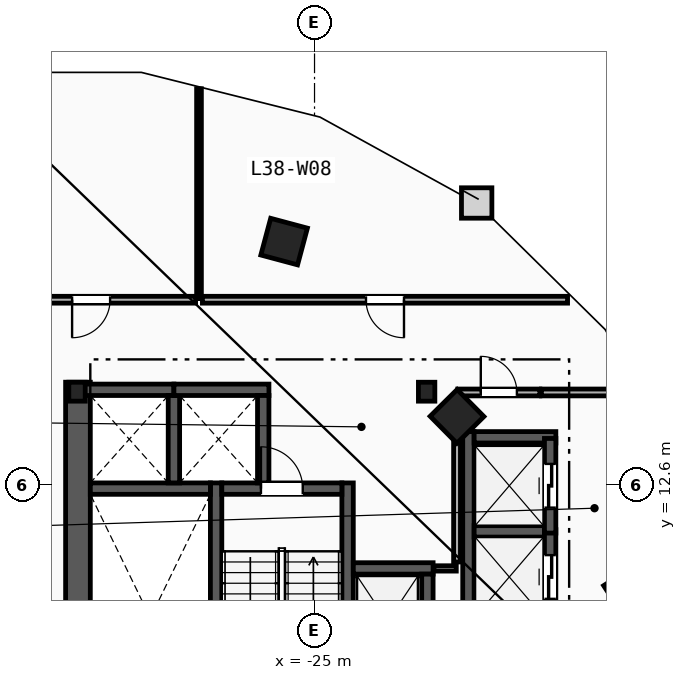
"""IFC4 building model, lengths in metres.
Left out: names, types, materials, properties, quantities, classifications, styles, units other than length and angle.
Written with IfcOpenShell. Run it as: python <this file> out.ifc"""

import sys

from ifc_helpers import new_model, si_unit, direction, frame, frame_2d, origin, origin_2d, place, context, subcontext, project, spatial, rectangle, i_section, extrude, element, fill, save


model = new_model("IFC4")
c1 = context("Model", 3, precision=1e-05, world=origin(), true_north=direction((0.0, 1.0)))
c2 = subcontext(c1, "Body", "Model", "MODEL_VIEW")
j1 = project(units=[si_unit("LENGTHUNIT", "METRE"), si_unit("PLANEANGLEUNIT", "RADIAN")], contexts=[c1])
p1 = place(None, origin())
s1 = spatial("IfcSite", under=j1, at=p1, CompositionType="ELEMENT")
p2 = place(p1, origin())
s2 = spatial("IfcBuilding", under=s1, at=p2, CompositionType="ELEMENT")
p3 = place(p2, frame((0.0, 0.0, 147.6)))
s3 = spatial("IfcBuildingStorey", under=s2, at=p3, CompositionType="ELEMENT", Elevation=147.6)
for number, where, z_axis, x_axis in (
    (1, (-22.05, 15.05, 0.0), (0.0, 0.0, 1.0), (1.0, 0.0, 0.0)),
    (2, (-31.25, 15.05, 0.0), (0.0, 0.0, 1.0), (1.0, 0.0, 0.0)),
):
    element("IfcColumn", number, at=place(p3, frame(where, z_axis=z_axis, x_axis=x_axis)), inside=s3, PredefinedType="COLUMN", context=c2, shape_type="SweptSolid", body=[
        extrude(i_section(OverallWidth=0.432, OverallDepth=0.498, WebThickness=0.056, FlangeThickness=0.089, FilletRadius=0.018, at=origin_2d()), origin(), (0.0, 0.0, 1.0), 3.6),
    ])
for number, where, z_axis, x_axis in (
    (3, (-16.7, 9.8, 0.0), (0.0, 0.0, 1.0), (-0.544, 0.839, 0.0)),
    (4, (-21.25, 14.4, 0.0), (0.0, 0.0, 1.0), (-0.703, 0.711, 0.0)),
    (5, (-25.8, 19.0, 0.0), (0.0, 0.0, 1.0), (-0.966, 0.259, 0.0)),
):
    element("IfcColumn", number, at=place(p3, frame(where, z_axis=z_axis, x_axis=x_axis)), inside=s3, PredefinedType="COLUMN", context=c2, shape_type="SweptSolid", body=[
        extrude(rectangle(XDim=1.0, YDim=1.0, at=origin_2d()), origin(), (0.0, 0.0, 1.0), 3.6),
    ])
p4 = place(p3, frame((-31.225, 1.97, 0.0), z_axis=(0.0, 0.0, 1.0), x_axis=(0.0, 1.0, 0.0)))
e6 = element("IfcWall", 6, at=p4, inside=s3, PredefinedType="SHEAR", context=c2, shape_type="SweptSolid", body=[
    extrude(rectangle(XDim=13.33, YDim=0.65, at=frame_2d((6.665, 0.0))), origin(), (0.0, 0.0, 1.0), 3.36),
])
for number, where, z_axis, x_axis in (
    (7, (-27.59, 1.97, 0.0), (0.0, 0.0, 1.0), (0.0, 1.0, 0.0)),
    (8, (-24.13, 1.97, 0.0), (0.0, 0.0, 1.0), (0.0, 1.0, 0.0)),
):
    element("IfcWall", number, at=place(p3, frame(where, z_axis=z_axis, x_axis=x_axis)), inside=s3, PredefinedType="SHEAR", context=c2, shape_type="SweptSolid", body=[
        extrude(rectangle(XDim=10.68, YDim=0.3, at=frame_2d((5.34, 0.0))), origin(), (0.0, 0.0, 1.0), 3.36),
    ])
p5 = place(p3, frame((-30.9, 12.5, 0.0), z_axis=(0.0, 0.0, 1.0), x_axis=(1.0, 0.0, 0.0)))
e9 = element("IfcWall", 9, at=p5, inside=s3, PredefinedType="SHEAR", context=c2, shape_type="SweptSolid", body=[
    extrude(rectangle(XDim=3.16, YDim=0.3, at=frame_2d((1.58, 0.0))), origin(), (0.0, 0.0, 1.0), 3.36),
])
p6 = place(p3, frame((-27.44, 12.5, 0.0), z_axis=(0.0, 0.0, 1.0), x_axis=(1.0, 0.0, 0.0)))
e10 = element("IfcWall", 10, at=p6, inside=s3, PredefinedType="SHEAR", context=c2, shape_type="SweptSolid", body=[
    extrude(rectangle(XDim=3.16, YDim=0.3, at=frame_2d((1.58, 0.0))), origin(), (0.0, 0.0, 1.0), 3.36),
])
p7 = place(p6, frame((1.03, 0.0, 0.0)))
e11 = element("IfcOpeningElement", 11, at=p7, cuts=e10, PredefinedType="OPENING", context=c2, shape_type="SweptSolid", body=[
    extrude(rectangle(XDim=1.1, YDim=2.15, at=frame_2d((0.55, 1.075))), frame((0.0, 0.16, 0.0), z_axis=(0.0, -1.0, 0.0), x_axis=(1.0, 0.0, 0.0)), (0.0, 0.0, 1.0), 0.32),
])
p8 = place(p3, frame((-23.98, 10.4, 0.0), z_axis=(0.0, 0.0, 1.0), x_axis=(1.0, 0.0, 0.0)))
e12 = element("IfcWall", 12, at=p8, inside=s3, PredefinedType="SHEAR", context=c2, shape_type="SweptSolid", body=[
    extrude(rectangle(XDim=2.1, YDim=0.3, at=frame_2d((1.05, 0.0))), origin(), (0.0, 0.0, 1.0), 3.36),
])
for number, where, z_axis, x_axis in (
    (13, (-22.03, 7.75, 0.0), (0.0, 0.0, 1.0), (0.0, 1.0, 0.0)),
    (14, (-31.2, 15.1, 0.0), (0.0, 0.0, 1.0), (1.0, 0.0, 0.0)),
):
    element("IfcWall", number, at=place(p3, frame(where, z_axis=z_axis, x_axis=x_axis)), inside=s3, PredefinedType="SHEAR", context=c2, shape_type="SweptSolid", body=[
        extrude(rectangle(XDim=2.5, YDim=0.3, at=frame_2d((1.25, 0.0))), origin(), (0.0, 0.0, 1.0), 3.36),
    ])
p9 = place(p3, frame((-28.7, 12.65, 0.0), z_axis=(0.0, 0.0, 1.0), x_axis=(0.0, 1.0, 0.0)))
e15 = element("IfcWall", 15, at=p9, inside=s3, PredefinedType="SHEAR", context=c2, shape_type="SweptSolid", body=[
    extrude(rectangle(XDim=2.3, YDim=0.3, at=frame_2d((1.15, 0.0))), origin(), (0.0, 0.0, 1.0), 3.36),
])
p10 = place(p3, frame((-28.7, 15.1, 0.0), z_axis=(0.0, 0.0, 1.0), x_axis=(1.0, 0.0, 0.0)))
e16 = element("IfcWall", 16, at=p10, inside=s3, PredefinedType="SHEAR", context=c2, shape_type="SweptSolid", body=[
    extrude(rectangle(XDim=2.5, YDim=0.3, at=frame_2d((1.25, 0.0))), origin(), (0.0, 0.0, 1.0), 3.36),
])
p11 = place(p3, frame((-26.35, 12.65, 0.0), z_axis=(0.0, 0.0, 1.0), x_axis=(0.0, 1.0, 0.0)))
e17 = element("IfcWall", 17, at=p11, inside=s3, PredefinedType="SHEAR", context=c2, shape_type="SweptSolid", body=[
    extrude(rectangle(XDim=2.3, YDim=0.3, at=frame_2d((1.15, 0.0))), origin(), (0.0, 0.0, 1.0), 3.36),
])
p12 = place(p3, frame((-20.95, 8.75, 0.0), z_axis=(0.0, 0.0, 1.0), x_axis=(0.0, 1.0, 0.0)))
e18 = element("IfcWall", 18, at=p12, inside=s3, PredefinedType="SHEAR", context=c2, shape_type="SweptSolid", body=[
    extrude(rectangle(XDim=5.25, YDim=0.3, at=frame_2d((2.625, 0.0))), origin(), (0.0, 0.0, 1.0), 3.36),
])
p13 = place(p3, frame((-20.8, 13.85, 0.0), z_axis=(0.0, 0.0, 1.0), x_axis=(1.0, 0.0, 0.0)))
e19 = element("IfcWall", 19, at=p13, inside=s3, PredefinedType="SHEAR", context=c2, shape_type="SweptSolid", body=[
    extrude(rectangle(XDim=2.15, YDim=0.3, at=frame_2d((1.075, 0.0))), origin(), (0.0, 0.0, 1.0), 3.36),
])
p14 = place(p3, frame((-20.8, 11.375, 0.0), z_axis=(0.0, 0.0, 1.0), x_axis=(1.0, 0.0, 0.0)))
e20 = element("IfcWall", 20, at=p14, inside=s3, PredefinedType="SHEAR", context=c2, shape_type="SweptSolid", body=[
    extrude(rectangle(XDim=1.85, YDim=0.3, at=frame_2d((0.925, 0.0))), origin(), (0.0, 0.0, 1.0), 3.36),
])
p15 = place(p3, frame((-18.8, 8.93, 0.0), z_axis=(0.0, 0.0, 1.0), x_axis=(0.0, 1.0, 0.0)))
e21 = element("IfcWall", 21, at=p15, inside=s3, PredefinedType="SHEAR", context=c2, shape_type="SweptSolid", body=[
    extrude(rectangle(XDim=2.49, YDim=0.3, at=frame_2d((1.245, 0.0))), origin(), (0.0, 0.0, 1.0), 3.36),
])
p16 = place(p15, frame((0.67, 0.0, 0.0)))
e22 = element("IfcOpeningElement", 22, at=p16, cuts=e21, PredefinedType="OPENING", context=c2, shape_type="SweptSolid", body=[
    extrude(rectangle(XDim=1.15, YDim=2.2, at=frame_2d((0.575, 1.1))), frame((0.0, 0.16, 0.0), z_axis=(0.0, -1.0, 0.0), x_axis=(1.0, 0.0, 0.0)), (0.0, 0.0, 1.0), 0.32),
])
p17 = place(p3, frame((-18.8, 11.33, 0.0), z_axis=(0.0, 0.0, 1.0), x_axis=(0.0, 1.0, 0.0)))
e23 = element("IfcWall", 23, at=p17, inside=s3, PredefinedType="SHEAR", context=c2, shape_type="SweptSolid", body=[
    extrude(rectangle(XDim=2.49, YDim=0.3, at=frame_2d((1.245, 0.0))), origin(), (0.0, 0.0, 1.0), 3.36),
])
p18 = place(p17, frame((0.67, 0.0, 0.0)))
e24 = element("IfcOpeningElement", 24, at=p18, cuts=e23, PredefinedType="OPENING", context=c2, shape_type="SweptSolid", body=[
    extrude(rectangle(XDim=1.15, YDim=2.2, at=frame_2d((0.575, 1.1))), frame((0.0, 0.16, 0.0), z_axis=(0.0, -1.0, 0.0), x_axis=(1.0, 0.0, 0.0)), (0.0, 0.0, 1.0), 0.32),
])
p19 = place(p3, frame((-21.23, 15.03, 0.0), z_axis=(0.0, 0.0, 1.0), x_axis=(1.0, 0.0, 0.0)))
e25 = element("IfcWall", 25, at=p19, inside=s3, PredefinedType="PARTITIONING", context=c2, shape_type="SweptSolid", body=[
    extrude(rectangle(XDim=2.16, YDim=0.18, at=frame_2d((1.08, 0.0))), origin(), (0.0, 0.0, 1.0), 3.36),
])
p20 = place(p19, frame((0.605, 0.0, 0.0)))
e26 = element("IfcOpeningElement", 26, at=p20, cuts=e25, PredefinedType="OPENING", context=c2, shape_type="SweptSolid", body=[
    extrude(rectangle(XDim=0.95, YDim=2.1, at=frame_2d((0.475, 1.05))), frame((0.0, 0.1, 0.0), z_axis=(0.0, -1.0, 0.0), x_axis=(1.0, 0.0, 0.0)), (0.0, 0.0, 1.0), 0.2),
])
p21 = place(p3, frame((-19.03, 15.03, 0.0), z_axis=(0.0, 0.0, 1.0), x_axis=(1.0, 0.0, 0.0)))
e27 = element("IfcWall", 27, at=p21, inside=s3, PredefinedType="PARTITIONING", context=c2, shape_type="SweptSolid", body=[
    extrude(rectangle(XDim=1.99, YDim=0.18, at=frame_2d((0.995, 0.0))), origin(), (0.0, 0.0, 1.0), 3.36),
])
p22 = place(p3, frame((-21.86, 10.4, 0.0), z_axis=(0.0, 0.0, 1.0), x_axis=(1.0, 0.0, 0.0)))
e28 = element("IfcWall", 28, at=p22, inside=s3, PredefinedType="PARTITIONING", context=c2, shape_type="SweptSolid", body=[
    extrude(rectangle(XDim=0.59, YDim=0.14, at=frame_2d((0.295, 0.0))), origin(), (0.0, 0.0, 1.0), 3.36),
])
p23 = place(p3, frame((-21.25, 10.57, 0.0), z_axis=(0.0, 0.0, 1.0), x_axis=(0.0, 1.0, 0.0)))
e29 = element("IfcWall", 29, at=p23, inside=s3, PredefinedType="PARTITIONING", context=c2, shape_type="SweptSolid", body=[
    extrude(rectangle(XDim=4.36, YDim=0.18, at=frame_2d((2.18, 0.0))), origin(), (0.0, 0.0, 1.0), 3.36),
])
p24 = place(p3, frame((-28.04, 17.5, 0.0), z_axis=(0.0, 0.0, 1.0), x_axis=(0.0, 1.0, 0.0)))
e30 = element("IfcWall", 30, at=p24, inside=s3, PredefinedType="PARTITIONING", context=c2, shape_type="SweptSolid", body=[
    extrude(rectangle(XDim=5.521, YDim=0.125, at=frame_2d((2.761, 0.0))), origin(), (0.0, 0.0, 1.0), 3.36),
])
p25 = place(p3, frame((-28.13, 17.47, 0.0), z_axis=(0.0, 0.0, 1.0), x_axis=(-1.0, 0.0, 0.0)))
e31 = element("IfcWall", 31, at=p25, inside=s3, PredefinedType="PARTITIONING", context=c2, shape_type="SweptSolid", body=[
    extrude(rectangle(XDim=5.499, YDim=0.18, at=frame_2d((2.749, 0.0))), origin(), (0.0, 0.0, 1.0), 3.36),
])
p26 = place(p25, frame((2.249, 0.0, 0.0)))
e32 = element("IfcOpeningElement", 32, at=p26, cuts=e31, PredefinedType="OPENING", context=c2, shape_type="SweptSolid", body=[
    extrude(rectangle(XDim=1.0, YDim=2.15, at=frame_2d((0.5, 1.075))), frame((0.0, 0.1, 0.0), z_axis=(0.0, -1.0, 0.0), x_axis=(1.0, 0.0, 0.0)), (0.0, 0.0, 1.0), 0.2),
])
p27 = place(p3, frame((-18.342, 17.47, 0.0), z_axis=(0.0, 0.0, 1.0), x_axis=(-1.0, 0.0, 0.0)))
e33 = element("IfcWall", 33, at=p27, inside=s3, PredefinedType="PARTITIONING", context=c2, shape_type="SweptSolid", body=[
    extrude(rectangle(XDim=9.608, YDim=0.18, at=frame_2d((4.804, 0.0))), origin(), (0.0, 0.0, 1.0), 3.36),
])
p28 = place(p27, frame((4.304, 0.0, 0.0)))
e34 = element("IfcOpeningElement", 34, at=p28, cuts=e33, PredefinedType="OPENING", context=c2, shape_type="SweptSolid", body=[
    extrude(rectangle(XDim=1.0, YDim=2.15, at=frame_2d((0.5, 1.075))), frame((0.0, 0.1, 0.0), z_axis=(0.0, -1.0, 0.0), x_axis=(1.0, 0.0, 0.0)), (0.0, 0.0, 1.0), 0.2),
])
p29 = place(p7, origin())
e35 = element("IfcDoor", 35, at=p29, inside=s3, OperationType="SINGLE_SWING_LEFT", PredefinedType="DOOR", context=c2, shape_type="SweptSolid", body=[
    extrude(rectangle(XDim=1.1, YDim=2.15, at=frame_2d((0.55, 1.075))), frame((0.0, 0.025, 0.0), z_axis=(0.0, -1.0, 0.0), x_axis=(1.0, 0.0, 0.0)), (0.0, 0.0, 1.0), 0.05),
])
fill(e11, e35)
p30 = place(p16, origin())
e36 = element("IfcDoor", 36, at=p30, inside=s3, OperationType="SLIDING_TO_LEFT", PredefinedType="TRAPDOOR", context=c2, shape_type="SweptSolid", body=[
    extrude(rectangle(XDim=1.15, YDim=2.2, at=frame_2d((0.575, 1.1))), frame((0.0, 0.025, 0.0), z_axis=(0.0, -1.0, 0.0), x_axis=(1.0, 0.0, 0.0)), (0.0, 0.0, 1.0), 0.05),
])
fill(e22, e36)
p31 = place(p18, origin())
e37 = element("IfcDoor", 37, at=p31, inside=s3, OperationType="SLIDING_TO_LEFT", PredefinedType="TRAPDOOR", context=c2, shape_type="SweptSolid", body=[
    extrude(rectangle(XDim=1.15, YDim=2.2, at=frame_2d((0.575, 1.1))), frame((0.0, 0.025, 0.0), z_axis=(0.0, -1.0, 0.0), x_axis=(1.0, 0.0, 0.0)), (0.0, 0.0, 1.0), 0.05),
])
fill(e24, e37)
p32 = place(p28, origin())
e38 = element("IfcDoor", 38, at=p32, inside=s3, OperationType="SINGLE_SWING_LEFT", PredefinedType="DOOR", context=c2, shape_type="SweptSolid", body=[
    extrude(rectangle(XDim=1.0, YDim=2.15, at=frame_2d((0.5, 1.075))), frame((0.0, 0.025, 0.0), z_axis=(0.0, -1.0, 0.0), x_axis=(1.0, 0.0, 0.0)), (0.0, 0.0, 1.0), 0.05),
])
fill(e34, e38)
p33 = place(p26, origin())
e39 = element("IfcDoor", 39, at=p33, inside=s3, OperationType="SINGLE_SWING_RIGHT", PredefinedType="DOOR", context=c2, shape_type="SweptSolid", body=[
    extrude(rectangle(XDim=1.0, YDim=2.15, at=frame_2d((0.5, 1.075))), frame((0.0, 0.025, 0.0), z_axis=(0.0, -1.0, 0.0), x_axis=(1.0, 0.0, 0.0)), (0.0, 0.0, 1.0), 0.05),
])
fill(e32, e39)
p34 = place(p20, origin())
e40 = element("IfcDoor", 40, at=p34, inside=s3, OperationType="SINGLE_SWING_LEFT", PredefinedType="DOOR", context=c2, shape_type="SweptSolid", body=[
    extrude(rectangle(XDim=0.95, YDim=2.1, at=frame_2d((0.475, 1.05))), frame((0.0, 0.025, 0.0), z_axis=(0.0, -1.0, 0.0), x_axis=(1.0, 0.0, 0.0)), (0.0, 0.0, 1.0), 0.05),
])
fill(e26, e40)
save(model, sys.argv[1])
